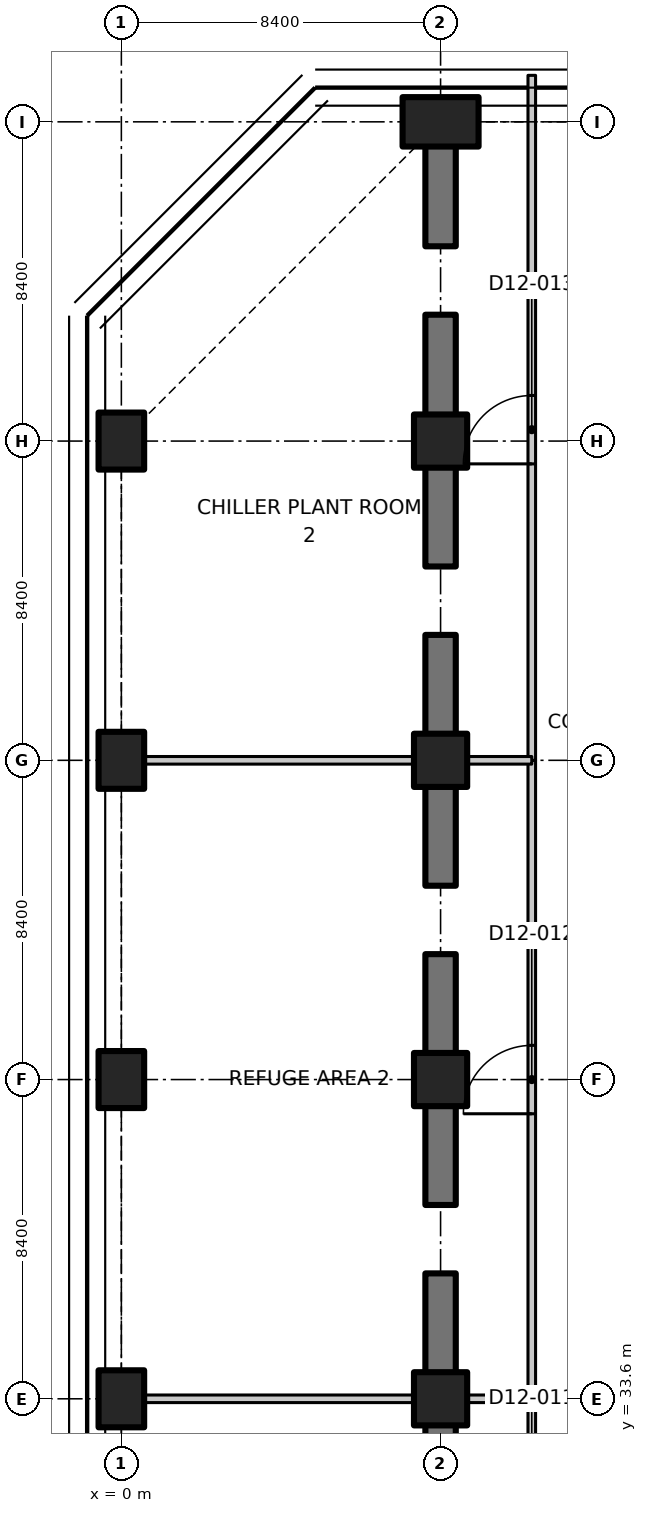
"""IFC4 building model, lengths in metres.
Left out: names, types, materials, properties, quantities, classifications, styles, units other than length and angle.
Written with IfcOpenShell. Run it as: python <this file> out.ifc"""

import sys

from ifc_helpers import new_model, si_unit, direction, frame, frame_2d, origin, origin_2d, place, context, subcontext, project, spatial, polyline, rectangle, outline, extrude, element, fill, save


model = new_model("IFC4")
c1 = context("Model", 3, precision=1e-05, world=origin(), true_north=direction((0.0, 1.0)))
c2 = subcontext(c1, "Body", "Model", "MODEL_VIEW")
j1 = project(units=[si_unit("LENGTHUNIT", "METRE"), si_unit("PLANEANGLEUNIT", "RADIAN")], contexts=[c1])
p1 = place(None, origin())
s1 = spatial("IfcSite", under=j1, at=p1, CompositionType="ELEMENT")
p2 = place(p1, origin())
s2 = spatial("IfcBuilding", under=s1, at=p2, CompositionType="ELEMENT")
p3 = place(p2, frame((0.0, 0.0, 86.9)))
s3 = spatial("IfcBuildingStorey", under=s2, at=p3, CompositionType="ELEMENT", Elevation=86.9)
for number, where, z_axis, x_axis in (
    (1, (0.0, 33.6, 0.0), (0.0, 0.0, 1.0), (1.0, 0.0, 0.0)),
    (2, (0.0, 42.0, 0.0), (0.0, 0.0, 1.0), (1.0, 0.0, 0.0)),
    (3, (0.0, 50.4, 0.0), (0.0, 0.0, 1.0), (1.0, 0.0, 0.0)),
    (4, (0.0, 58.8, 0.0), (0.0, 0.0, 1.0), (1.0, 0.0, 0.0)),
):
    element("IfcColumn", number, at=place(p3, frame(where, z_axis=z_axis, x_axis=x_axis)), inside=s3, PredefinedType="COLUMN", context=c2, shape_type="SweptSolid", body=[
        extrude(rectangle(XDim=1.2, YDim=1.5, at=origin_2d()), origin(), (0.0, 0.0, 1.0), 4.55),
    ])
for number, where, z_axis, x_axis in (
    (5, (8.4, 33.6, 0.0), (0.0, 0.0, 1.0), (1.0, 0.0, 0.0)),
    (6, (8.4, 42.0, 0.0), (0.0, 0.0, 1.0), (1.0, 0.0, 0.0)),
    (7, (8.4, 50.4, 0.0), (0.0, 0.0, 1.0), (1.0, 0.0, 0.0)),
    (8, (8.4, 58.8, 0.0), (0.0, 0.0, 1.0), (1.0, 0.0, 0.0)),
):
    element("IfcColumn", number, at=place(p3, frame(where, z_axis=z_axis, x_axis=x_axis)), inside=s3, PredefinedType="COLUMN", context=c2, shape_type="SweptSolid", body=[
        extrude(rectangle(XDim=1.4, YDim=1.4, at=origin_2d()), origin(), (0.0, 0.0, 1.0), 4.55),
    ])
p4 = place(p3, frame((8.4, 67.2, 0.0), z_axis=(0.0, 0.0, 1.0), x_axis=(0.0, 1.0, 0.0)))
e9 = element("IfcColumn", 9, at=p4, inside=s3, PredefinedType="COLUMN", context=c2, shape_type="SweptSolid", body=[
    extrude(rectangle(XDim=1.3, YDim=2.0, at=origin_2d()), origin(), (0.0, 0.0, 1.0), 4.55),
])
for number, where, z_axis, x_axis in (
    (10, (8.4, 30.3, 0.0), (0.0, 0.0, 1.0), (0.0, 1.0, 0.0)),
    (11, (8.4, 34.27, 0.0), (0.0, 0.0, 1.0), (0.0, 1.0, 0.0)),
):
    element("IfcWall", number, at=place(p3, frame(where, z_axis=z_axis, x_axis=x_axis)), inside=s3, PredefinedType="SHEAR", context=c2, shape_type="SweptSolid", body=[
        extrude(rectangle(XDim=2.63, YDim=0.8, at=frame_2d((1.315, 0.0))), origin(), (0.0, 0.0, 1.0), 4.55),
    ])
for number, where, z_axis, x_axis in (
    (12, (8.4, 38.7, 0.0), (0.0, 0.0, 1.0), (0.0, 1.0, 0.0)),
    (13, (8.4, 42.67, 0.0), (0.0, 0.0, 1.0), (0.0, 1.0, 0.0)),
):
    element("IfcWall", number, at=place(p3, frame(where, z_axis=z_axis, x_axis=x_axis)), inside=s3, PredefinedType="SHEAR", context=c2, shape_type="SweptSolid", body=[
        extrude(rectangle(XDim=2.63, YDim=0.8, at=frame_2d((1.315, 0.0))), origin(), (0.0, 0.0, 1.0), 4.55),
    ])
for number, where, z_axis, x_axis in (
    (14, (8.4, 47.1, 0.0), (0.0, 0.0, 1.0), (0.0, 1.0, 0.0)),
    (15, (8.4, 51.07, 0.0), (0.0, 0.0, 1.0), (0.0, 1.0, 0.0)),
    (16, (8.4, 55.5, 0.0), (0.0, 0.0, 1.0), (0.0, 1.0, 0.0)),
):
    element("IfcWall", number, at=place(p3, frame(where, z_axis=z_axis, x_axis=x_axis)), inside=s3, PredefinedType="SHEAR", context=c2, shape_type="SweptSolid", body=[
        extrude(rectangle(XDim=2.63, YDim=0.8, at=frame_2d((1.315, 0.0))), origin(), (0.0, 0.0, 1.0), 4.55),
    ])
for number, where, z_axis, x_axis in (
    (17, (8.4, 59.47, 0.0), (0.0, 0.0, 1.0), (0.0, 1.0, 0.0)),
    (18, (8.4, 63.925, 0.0), (0.0, 0.0, 1.0), (0.0, 1.0, 0.0)),
):
    element("IfcWall", number, at=place(p3, frame(where, z_axis=z_axis, x_axis=x_axis)), inside=s3, PredefinedType="SHEAR", context=c2, shape_type="SweptSolid", body=[
        extrude(rectangle(XDim=2.655, YDim=0.8, at=frame_2d((1.328, 0.0))), origin(), (0.0, 0.0, 1.0), 4.55),
    ])
p5 = place(p3, frame((10.8, 29.4, 0.0), z_axis=(0.0, 0.0, 1.0), x_axis=(0.0, 1.0, 0.0)))
e19 = element("IfcWall", 19, at=p5, inside=s3, PredefinedType="PARTITIONING", context=c2, shape_type="SweptSolid", body=[
    extrude(rectangle(XDim=4.2, YDim=0.2, at=frame_2d((2.1, 0.0))), origin(), (0.0, 0.0, 1.0), 4.53),
])
p6 = place(p5, frame((1.5, 0.0, 0.0)))
e20 = element("IfcOpeningElement", 20, at=p6, cuts=e19, PredefinedType="OPENING", context=c2, shape_type="SweptSolid", body=[
    extrude(rectangle(XDim=1.0, YDim=2.1, at=frame_2d((0.5, 1.05))), frame((0.0, 0.11, 0.0), z_axis=(0.0, -1.0, 0.0), x_axis=(1.0, 0.0, 0.0)), (0.0, 0.0, 1.0), 0.22),
])
p7 = place(p3, frame((10.8, 33.6, 0.0), z_axis=(0.0, 0.0, 1.0), x_axis=(0.0, 1.0, 0.0)))
e21 = element("IfcWall", 21, at=p7, inside=s3, PredefinedType="PARTITIONING", context=c2, shape_type="SweptSolid", body=[
    extrude(rectangle(XDim=16.8, YDim=0.2, at=frame_2d((8.4, 0.0))), origin(), (0.0, 0.0, 1.0), 4.53),
])
p8 = place(p7, frame((7.5, 0.0, 0.0)))
e22 = element("IfcOpeningElement", 22, at=p8, cuts=e21, PredefinedType="OPENING", context=c2, shape_type="SweptSolid", body=[
    extrude(rectangle(XDim=1.8, YDim=2.1, at=frame_2d((0.9, 1.05))), frame((0.0, 0.11, 0.0), z_axis=(0.0, -1.0, 0.0), x_axis=(1.0, 0.0, 0.0)), (0.0, 0.0, 1.0), 0.22),
])
p9 = place(p3, frame((10.8, 50.4, 0.0), z_axis=(0.0, 0.0, 1.0), x_axis=(0.0, 1.0, 0.0)))
e23 = element("IfcWall", 23, at=p9, inside=s3, PredefinedType="PARTITIONING", context=c2, shape_type="SweptSolid", body=[
    extrude(outline(polyline([(0.0, 0.0), (18.023, 0.0), (18.023, 4.53), (17.88, 4.53), (17.25, 4.53), (17.248, 4.18), (16.352, 4.18), (16.35, 4.53), (0.0, 4.53), (0.0, 0.0)])), frame((0.0, 0.1, 0.0), z_axis=(0.0, -1.0, 0.0), x_axis=(1.0, 0.0, 0.0)), (0.0, 0.0, 1.0), 0.2),
])
p10 = place(p9, frame((7.8, 0.0, 0.0)))
e24 = element("IfcOpeningElement", 24, at=p10, cuts=e23, PredefinedType="OPENING", context=c2, shape_type="SweptSolid", body=[
    extrude(rectangle(XDim=1.8, YDim=2.1, at=frame_2d((0.9, 1.05))), frame((0.0, 0.11, 0.0), z_axis=(0.0, -1.0, 0.0), x_axis=(1.0, 0.0, 0.0)), (0.0, 0.0, 1.0), 0.22),
])
p11 = place(p3, frame((0.62, 33.6, 0.0), z_axis=(0.0, 0.0, 1.0), x_axis=(1.0, 0.0, 0.0)))
e25 = element("IfcWall", 25, at=p11, inside=s3, PredefinedType="PARTITIONING", context=c2, shape_type="SweptSolid", body=[
    extrude(rectangle(XDim=7.06, YDim=0.2, at=frame_2d((3.53, 0.0))), origin(), (0.0, 0.0, 1.0), 4.53),
])
p12 = place(p3, frame((9.12, 33.6, 0.0), z_axis=(0.0, 0.0, 1.0), x_axis=(1.0, 0.0, 0.0)))
e26 = element("IfcWall", 26, at=p12, inside=s3, PredefinedType="PARTITIONING", context=c2, shape_type="SweptSolid", body=[
    extrude(rectangle(XDim=1.68, YDim=0.2, at=frame_2d((0.84, 0.0))), origin(), (0.0, 0.0, 1.0), 4.53),
])
p13 = place(p3, frame((0.62, 50.4, 0.0), z_axis=(0.0, 0.0, 1.0), x_axis=(1.0, 0.0, 0.0)))
e27 = element("IfcWall", 27, at=p13, inside=s3, PredefinedType="PARTITIONING", context=c2, shape_type="SweptSolid", body=[
    extrude(rectangle(XDim=7.06, YDim=0.2, at=frame_2d((3.53, 0.0))), origin(), (0.0, 0.0, 1.0), 4.53),
])
p14 = place(p3, frame((9.12, 50.4, 0.0), z_axis=(0.0, 0.0, 1.0), x_axis=(1.0, 0.0, 0.0)))
e28 = element("IfcWall", 28, at=p14, inside=s3, PredefinedType="PARTITIONING", context=c2, shape_type="SweptSolid", body=[
    extrude(rectangle(XDim=1.68, YDim=0.2, at=frame_2d((0.84, 0.0))), origin(), (0.0, 0.0, 1.0), 4.53),
])
p15 = place(p8, origin())
e29 = element("IfcDoor", 29, at=p15, inside=s3, OperationType="DOUBLE_DOOR_SINGLE_SWING", PredefinedType="DOOR", context=c2, shape_type="SweptSolid", body=[
    extrude(rectangle(XDim=1.8, YDim=2.1, at=frame_2d((0.9, 1.05))), frame((0.0, 0.025, 0.0), z_axis=(0.0, -1.0, 0.0), x_axis=(1.0, 0.0, 0.0)), (0.0, 0.0, 1.0), 0.05),
])
fill(e22, e29)
p16 = place(p10, origin())
e30 = element("IfcDoor", 30, at=p16, inside=s3, OperationType="DOUBLE_DOOR_SINGLE_SWING", PredefinedType="DOOR", context=c2, shape_type="SweptSolid", body=[
    extrude(rectangle(XDim=1.8, YDim=2.1, at=frame_2d((0.9, 1.05))), frame((0.0, 0.025, 0.0), z_axis=(0.0, -1.0, 0.0), x_axis=(1.0, 0.0, 0.0)), (0.0, 0.0, 1.0), 0.05),
])
fill(e24, e30)
save(model, sys.argv[1])
